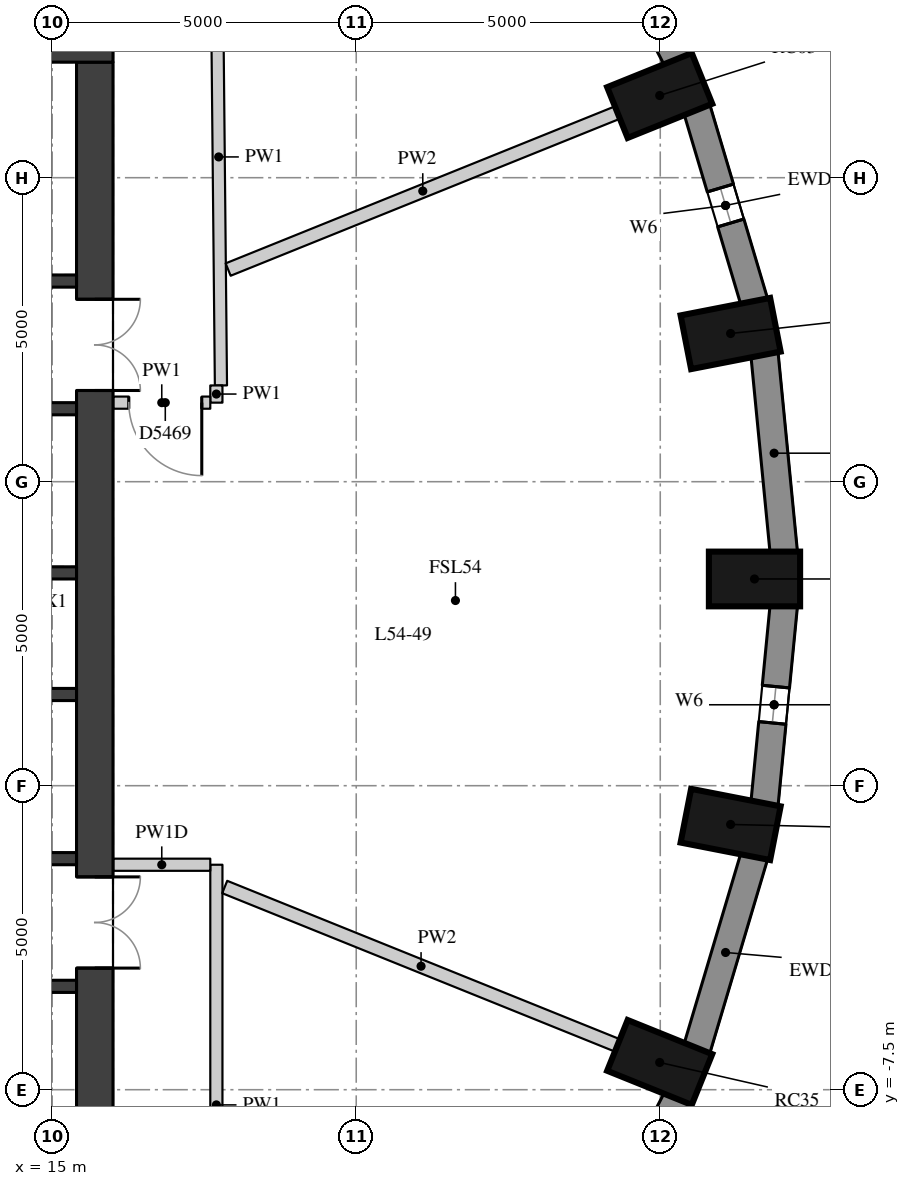
"""IFC4 building model, lengths in metres.
Left out: names, types, materials, properties, quantities, classifications, styles, units other than length and angle.
Written with IfcOpenShell. Run it as: python <this file> out.ifc"""

import sys

from ifc_helpers import new_model, si_unit, direction, frame, frame_2d, origin, origin_2d, place, context, subcontext, project, spatial, rectangle, extrude, element, fill, save


model = new_model("IFC4")
c1 = context("Model", 3, precision=1e-05, world=origin(), true_north=direction((0.0, 1.0)))
c2 = subcontext(c1, "Body", "Model", "MODEL_VIEW")
j1 = project(units=[si_unit("LENGTHUNIT", "METRE"), si_unit("PLANEANGLEUNIT", "RADIAN")], contexts=[c1])
p1 = place(None, origin())
s1 = spatial("IfcSite", under=j1, at=p1, CompositionType="ELEMENT")
p2 = place(p1, origin())
s2 = spatial("IfcBuilding", under=s1, at=p2, CompositionType="ELEMENT")
p3 = place(p2, frame((0.0, 0.0, 192.5)))
s3 = spatial("IfcBuildingStorey", under=s2, at=p3, CompositionType="ELEMENT", Elevation=192.5)
for number, where, z_axis, x_axis in (
    (1, (26.55, 0.9, 0.0), (0.0, 0.0, 1.0), (1.0, 0.0, 0.0)),
    (2, (26.157, 4.937, 0.0), (0.0, 0.0, 1.0), (0.981, 0.192, 0.0)),
    (3, (24.991, 8.852, 0.0), (0.0, 0.0, 1.0), (0.927, 0.374, 0.0)),
    (4, (24.991, -7.052, 0.0), (0.0, 0.0, 1.0), (0.927, -0.374, 0.0)),
    (5, (26.157, -3.137, 0.0), (0.0, 0.0, 1.0), (0.981, -0.192, 0.0)),
):
    element("IfcColumn", number, at=place(p3, frame(where, z_axis=z_axis, x_axis=x_axis)), inside=s3, PredefinedType="COLUMN", context=c2, shape_type="SweptSolid", body=[
        extrude(rectangle(XDim=1.5, YDim=0.9, at=origin_2d()), origin(), (0.0, 0.0, 1.0), 3.3),
    ])
p4 = place(p3, frame((27.032, 1.33, 0.0), z_axis=(0.0, 0.0, 1.0), x_axis=(-0.096824116835, 0.995301507283, 0.0)))
e6 = element("IfcWall", 6, at=p4, inside=s3, PredefinedType="SOLIDWALL", context=c2, shape_type="SweptSolid", body=[
    extrude(rectangle(XDim=3.293, YDim=0.45, at=frame_2d((1.646, 0.0))), origin(), (0.0, 0.0, 1.0), 3.02),
])
p5 = place(p3, frame((26.548, 5.452, 0.0), z_axis=(0.0, 0.0, 1.0), x_axis=(-0.285444972963, 0.958395099847, 0.0)))
e7 = element("IfcWall", 7, at=p5, inside=s3, PredefinedType="SOLIDWALL", context=c2, shape_type="SweptSolid", body=[
    extrude(rectangle(XDim=3.32, YDim=0.45, at=frame_2d((1.66, 0.0))), origin(), (0.0, 0.0, 1.0), 3.02),
])
p6 = place(p5, frame((1.36, 0.0, 0.4)))
e8 = element("IfcOpeningElement", 8, at=p6, cuts=e7, PredefinedType="OPENING", context=c2, shape_type="SweptSolid", body=[
    extrude(rectangle(XDim=0.6, YDim=1.75, at=frame_2d((0.3, 0.875))), frame((0.0, 0.235, 0.0), z_axis=(0.0, -1.0, 0.0), x_axis=(1.0, 0.0, 0.0)), (0.0, 0.0, 1.0), 0.47),
])
p7 = place(p3, frame((25.278, 9.432, 0.0), z_axis=(0.0, 0.0, 1.0), x_axis=(-0.460175500475, 0.887827972505, 0.0)))
e9 = element("IfcWall", 9, at=p7, inside=s3, PredefinedType="SOLIDWALL", context=c2, shape_type="SweptSolid", body=[
    extrude(rectangle(XDim=3.371, YDim=0.45, at=frame_2d((1.685, 0.0))), origin(), (0.0, 0.0, 1.0), 3.02),
])
p8 = place(p3, frame((23.727, -10.624, 0.0), z_axis=(0.0, 0.0, 1.0), x_axis=(0.460175500475, 0.887827972505, 0.0)))
e10 = element("IfcWall", 10, at=p8, inside=s3, PredefinedType="SOLIDWALL", context=c2, shape_type="SweptSolid", body=[
    extrude(rectangle(XDim=3.371, YDim=0.45, at=frame_2d((1.685, 0.0))), origin(), (0.0, 0.0, 1.0), 3.02),
])
p9 = place(p8, frame((1.385, 0.0, 0.4)))
e11 = element("IfcOpeningElement", 11, at=p9, cuts=e10, PredefinedType="OPENING", context=c2, shape_type="SweptSolid", body=[
    extrude(rectangle(XDim=0.6, YDim=1.75, at=frame_2d((0.3, 0.875))), frame((0.0, 0.235, 0.0), z_axis=(0.0, -1.0, 0.0), x_axis=(1.0, 0.0, 0.0)), (0.0, 0.0, 1.0), 0.47),
])
p10 = place(p3, frame((25.6, -6.834, 0.0), z_axis=(0.0, 0.0, 1.0), x_axis=(0.285444972963, 0.958395099847, 0.0)))
e12 = element("IfcWall", 12, at=p10, inside=s3, PredefinedType="SOLIDWALL", context=c2, shape_type="SweptSolid", body=[
    extrude(rectangle(XDim=3.32, YDim=0.45, at=frame_2d((1.66, 0.0))), origin(), (0.0, 0.0, 1.0), 3.02),
])
p11 = place(p3, frame((26.713, -2.808, 0.0), z_axis=(0.0, 0.0, 1.0), x_axis=(0.096816972749, 0.995302202242, 0.0)))
e13 = element("IfcWall", 13, at=p11, inside=s3, PredefinedType="SOLIDWALL", context=c2, shape_type="SweptSolid", body=[
    extrude(rectangle(XDim=3.293, YDim=0.45, at=frame_2d((1.646, 0.0))), origin(), (0.0, 0.0, 1.0), 3.02),
])
p12 = place(p11, frame((1.347, 0.0, 0.4)))
e14 = element("IfcOpeningElement", 14, at=p12, cuts=e13, PredefinedType="OPENING", context=c2, shape_type="SweptSolid", body=[
    extrude(rectangle(XDim=0.6, YDim=1.75, at=frame_2d((0.3, 0.875))), frame((0.0, 0.235, 0.0), z_axis=(0.0, -1.0, 0.0), x_axis=(1.0, 0.0, 0.0)), (0.0, 0.0, 1.0), 0.47),
])
p13 = place(p3, frame((15.7, -9.4, 0.0), z_axis=(0.0, 0.0, 1.0), x_axis=(0.0, 1.0, 0.0)))
e15 = element("IfcWall", 15, at=p13, inside=s3, PredefinedType="SHEAR", context=c2, shape_type="SweptSolid", body=[
    extrude(rectangle(XDim=18.8, YDim=0.6, at=frame_2d((9.4, 0.0))), origin(), (0.0, 0.0, 1.0), 3.02),
])
p14 = place(p13, frame((13.4, 0.0, 0.0)))
e16 = element("IfcOpeningElement", 16, at=p14, cuts=e15, PredefinedType="OPENING", context=c2, shape_type="SweptSolid", body=[
    extrude(rectangle(XDim=1.5, YDim=2.1, at=frame_2d((0.75, 1.05))), frame((0.0, 0.31, 0.0), z_axis=(0.0, -1.0, 0.0), x_axis=(1.0, 0.0, 0.0)), (0.0, 0.0, 1.0), 0.62),
])
p15 = place(p13, frame((3.9, 0.0, 0.0)))
e17 = element("IfcOpeningElement", 17, at=p15, cuts=e15, PredefinedType="OPENING", context=c2, shape_type="SweptSolid", body=[
    extrude(rectangle(XDim=1.5, YDim=2.1, at=frame_2d((0.75, 1.05))), frame((0.0, 0.31, 0.0), z_axis=(0.0, -1.0, 0.0), x_axis=(1.0, 0.0, 0.0)), (0.0, 0.0, 1.0), 0.62),
])
p16 = place(p3, frame((4.0, 9.7, 0.0), z_axis=(0.0, 0.0, 1.0), x_axis=(1.0, 0.0, 0.0)))
e18 = element("IfcWall", 18, at=p16, inside=s3, PredefinedType="SHEAR", context=c2, shape_type="SweptSolid", body=[
    extrude(rectangle(XDim=12.0, YDim=0.6, at=frame_2d((6.0, 0.0))), origin(), (0.0, 0.0, 1.0), 3.02),
])
p17 = place(p3, frame((4.6, 5.8, 0.0), z_axis=(0.0, 0.0, 1.0), x_axis=(1.0, 0.0, 0.0)))
e19 = element("IfcWall", 19, at=p17, inside=s3, PredefinedType="SHEAR", context=c2, shape_type="SweptSolid", body=[
    extrude(rectangle(XDim=10.8, YDim=0.2, at=frame_2d((5.4, 0.0))), origin(), (0.0, 0.0, 1.0), 3.02),
])
p18 = place(p17, frame((7.05, 0.0, 0.0)))
e20 = element("IfcOpeningElement", 20, at=p18, cuts=e19, PredefinedType="OPENING", context=c2, shape_type="SweptSolid", body=[
    extrude(rectangle(XDim=1.1, YDim=2.1, at=frame_2d((0.55, 1.05))), frame((0.0, 0.11, 0.0), z_axis=(0.0, -1.0, 0.0), x_axis=(1.0, 0.0, 0.0)), (0.0, 0.0, 1.0), 0.22),
])
p19 = place(p17, frame((9.05, 0.0, 0.0)))
e21 = element("IfcOpeningElement", 21, at=p19, cuts=e19, PredefinedType="OPENING", context=c2, shape_type="SweptSolid", body=[
    extrude(rectangle(XDim=1.1, YDim=2.1, at=frame_2d((0.55, 1.05))), frame((0.0, 0.11, 0.0), z_axis=(0.0, -1.0, 0.0), x_axis=(1.0, 0.0, 0.0)), (0.0, 0.0, 1.0), 0.22),
])
p20 = place(p3, frame((4.6, 3.7, 0.0), z_axis=(0.0, 0.0, 1.0), x_axis=(1.0, 0.0, 0.0)))
e22 = element("IfcWall", 22, at=p20, inside=s3, PredefinedType="SHEAR", context=c2, shape_type="SweptSolid", body=[
    extrude(rectangle(XDim=10.8, YDim=0.2, at=frame_2d((5.4, 0.0))), origin(), (0.0, 0.0, 1.0), 3.02),
])
p21 = place(p20, frame((6.6, 0.0, 0.0)))
e23 = element("IfcOpeningElement", 23, at=p21, cuts=e22, PredefinedType="OPENING", context=c2, shape_type="SweptSolid", body=[
    extrude(rectangle(XDim=1.1, YDim=2.1, at=frame_2d((0.55, 1.05))), frame((0.0, 0.11, 0.0), z_axis=(0.0, -1.0, 0.0), x_axis=(1.0, 0.0, 0.0)), (0.0, 0.0, 1.0), 0.22),
])
p22 = place(p20, frame((8.9, 0.0, 0.0)))
e24 = element("IfcOpeningElement", 24, at=p22, cuts=e22, PredefinedType="OPENING", context=c2, shape_type="SweptSolid", body=[
    extrude(rectangle(XDim=1.1, YDim=2.1, at=frame_2d((0.55, 1.05))), frame((0.0, 0.11, 0.0), z_axis=(0.0, -1.0, 0.0), x_axis=(1.0, 0.0, 0.0)), (0.0, 0.0, 1.0), 0.22),
])
for number, where, z_axis, x_axis in (
    (25, (4.6, 1.0, 0.0), (0.0, 0.0, 1.0), (1.0, 0.0, 0.0)),
    (26, (4.6, -1.0, 0.0), (0.0, 0.0, 1.0), (1.0, 0.0, 0.0)),
):
    element("IfcWall", number, at=place(p3, frame(where, z_axis=z_axis, x_axis=x_axis)), inside=s3, PredefinedType="SHEAR", context=c2, shape_type="SweptSolid", body=[
        extrude(rectangle(XDim=10.8, YDim=0.2, at=frame_2d((5.4, 0.0))), origin(), (0.0, 0.0, 1.0), 3.02),
    ])
p23 = place(p3, frame((4.6, -3.7, 0.0), z_axis=(0.0, 0.0, 1.0), x_axis=(1.0, 0.0, 0.0)))
e27 = element("IfcWall", 27, at=p23, inside=s3, PredefinedType="SHEAR", context=c2, shape_type="SweptSolid", body=[
    extrude(rectangle(XDim=10.8, YDim=0.2, at=frame_2d((5.4, 0.0))), origin(), (0.0, 0.0, 1.0), 3.02),
])
p24 = place(p23, frame((6.6, 0.0, 0.0)))
e28 = element("IfcOpeningElement", 28, at=p24, cuts=e27, PredefinedType="OPENING", context=c2, shape_type="SweptSolid", body=[
    extrude(rectangle(XDim=1.1, YDim=2.1, at=frame_2d((0.55, 1.05))), frame((0.0, 0.11, 0.0), z_axis=(0.0, -1.0, 0.0), x_axis=(1.0, 0.0, 0.0)), (0.0, 0.0, 1.0), 0.22),
])
p25 = place(p23, frame((8.9, 0.0, 0.0)))
e29 = element("IfcOpeningElement", 29, at=p25, cuts=e27, PredefinedType="OPENING", context=c2, shape_type="SweptSolid", body=[
    extrude(rectangle(XDim=1.1, YDim=2.1, at=frame_2d((0.55, 1.05))), frame((0.0, 0.11, 0.0), z_axis=(0.0, -1.0, 0.0), x_axis=(1.0, 0.0, 0.0)), (0.0, 0.0, 1.0), 0.22),
])
p26 = place(p3, frame((4.6, -5.8, 0.0), z_axis=(0.0, 0.0, 1.0), x_axis=(1.0, 0.0, 0.0)))
e30 = element("IfcWall", 30, at=p26, inside=s3, PredefinedType="SHEAR", context=c2, shape_type="SweptSolid", body=[
    extrude(rectangle(XDim=10.8, YDim=0.2, at=frame_2d((5.4, 0.0))), origin(), (0.0, 0.0, 1.0), 3.02),
])
p27 = place(p3, frame((17.7, -3.8, 0.0), z_axis=(0.0, 0.0, 1.0), x_axis=(0.0, -1.0, 0.0)))
e31 = element("IfcWall", 31, at=p27, inside=s3, PredefinedType="PARTITIONING", context=c2, shape_type="SweptSolid", body=[
    extrude(rectangle(XDim=7.9, YDim=0.2, at=frame_2d((3.95, 0.0))), origin(), (0.0, 0.0, 1.0), 3.02),
])
p28 = place(p3, frame((17.701, 11.6, 0.0), z_axis=(0.0, 0.0, 1.0), x_axis=(0.009840700525, -0.999951579134, 0.0)))
e32 = element("IfcWall", 32, at=p28, inside=s3, PredefinedType="PARTITIONING", context=c2, shape_type="SweptSolid", body=[
    extrude(rectangle(XDim=7.517, YDim=0.2, at=frame_2d((3.759, 0.0))), origin(), (0.0, 0.0, 1.0), 3.02),
])
p29 = place(p3, frame((17.7, 4.083, 0.0), z_axis=(0.0, 0.0, 1.0), x_axis=(0.0, -1.0, 0.0)))
e33 = element("IfcWall", 33, at=p29, inside=s3, PredefinedType="PARTITIONING", context=c2, shape_type="SweptSolid", body=[
    extrude(rectangle(XDim=0.283, YDim=0.2, at=frame_2d((0.142, 0.0))), origin(), (0.0, 0.0, 1.0), 3.02),
])
p30 = place(p3, frame((17.6, 3.8, 0.0), z_axis=(0.0, 0.0, 1.0), x_axis=(-1.0, 0.0, 0.0)))
e34 = element("IfcWall", 34, at=p30, inside=s3, PredefinedType="PARTITIONING", context=c2, shape_type="SweptSolid", body=[
    extrude(rectangle(XDim=1.596, YDim=0.2, at=frame_2d((0.798, 0.0))), origin(), (0.0, 0.0, 1.0), 3.02),
])
p31 = place(p30, frame((0.14, 0.0, 0.0)))
e35 = element("IfcOpeningElement", 35, at=p31, cuts=e34, PredefinedType="OPENING", context=c2, shape_type="SweptSolid", body=[
    extrude(rectangle(XDim=1.2, YDim=2.1, at=frame_2d((0.6, 1.05))), frame((0.0, 0.11, 0.0), z_axis=(0.0, -1.0, 0.0), x_axis=(1.0, 0.0, 0.0)), (0.0, 0.0, 1.0), 0.22),
])
p32 = place(p3, frame((16.004, -3.8, 0.0), z_axis=(0.0, 0.0, 1.0), x_axis=(1.0, 0.0, 0.0)))
e36 = element("IfcWall", 36, at=p32, inside=s3, PredefinedType="PARTITIONING", context=c2, shape_type="SweptSolid", body=[
    extrude(rectangle(XDim=1.596, YDim=0.2, at=frame_2d((0.798, 0.0))), origin(), (0.0, 0.0, 1.0), 2.47),
])
p33 = place(p3, frame((24.295, 8.571, 0.0), z_axis=(0.0, 0.0, 1.0), x_axis=(-0.927397147779, -0.374078240869, 0.0)))
e37 = element("IfcWall", 37, at=p33, inside=s3, PredefinedType="PARTITIONING", context=c2, shape_type="SweptSolid", body=[
    extrude(rectangle(XDim=6.903, YDim=0.22, at=frame_2d((3.452, 0.0))), origin(), (0.0, 0.0, 1.0), 3.02),
])
p34 = place(p3, frame((24.295, -6.771, 0.0), z_axis=(0.0, 0.0, 1.0), x_axis=(-0.927387137769, 0.374103056256, 0.0)))
e38 = element("IfcWall", 38, at=p34, inside=s3, PredefinedType="PARTITIONING", context=c2, shape_type="SweptSolid", body=[
    extrude(rectangle(XDim=6.964, YDim=0.22, at=frame_2d((3.482, 0.0))), origin(), (0.0, 0.0, 1.0), 3.02),
])
p35 = place(p6, origin())
e39 = element("IfcWindow", 39, at=p35, inside=s3, PartitioningType="SINGLE_PANEL", PredefinedType="WINDOW", context=c2, shape_type="SweptSolid", body=[
    extrude(rectangle(XDim=0.6, YDim=1.75, at=frame_2d((0.3, 0.875))), frame((0.0, 0.035, 0.0), z_axis=(0.0, -1.0, 0.0), x_axis=(1.0, 0.0, 0.0)), (0.0, 0.0, 1.0), 0.06),
])
fill(e8, e39)
p36 = place(p12, origin())
e40 = element("IfcWindow", 40, at=p36, inside=s3, PartitioningType="SINGLE_PANEL", PredefinedType="WINDOW", context=c2, shape_type="SweptSolid", body=[
    extrude(rectangle(XDim=0.6, YDim=1.75, at=frame_2d((0.3, 0.875))), frame((0.0, 0.035, 0.0), z_axis=(0.0, -1.0, 0.0), x_axis=(1.0, 0.0, 0.0)), (0.0, 0.0, 1.0), 0.06),
])
fill(e14, e40)
p37 = place(p14, origin())
e41 = element("IfcDoor", 41, at=p37, inside=s3, OperationType="DOUBLE_DOOR_SINGLE_SWING", PredefinedType="DOOR", context=c2, shape_type="SweptSolid", body=[
    extrude(rectangle(XDim=1.5, YDim=2.1, at=frame_2d((0.75, 1.05))), frame((0.0, 0.025, 0.0), z_axis=(0.0, -1.0, 0.0), x_axis=(1.0, 0.0, 0.0)), (0.0, 0.0, 1.0), 0.05),
])
fill(e16, e41)
p38 = place(p15, origin())
e42 = element("IfcDoor", 42, at=p38, inside=s3, OperationType="DOUBLE_DOOR_SINGLE_SWING", PredefinedType="DOOR", context=c2, shape_type="SweptSolid", body=[
    extrude(rectangle(XDim=1.5, YDim=2.1, at=frame_2d((0.75, 1.05))), frame((0.0, 0.025, 0.0), z_axis=(0.0, -1.0, 0.0), x_axis=(1.0, 0.0, 0.0)), (0.0, 0.0, 1.0), 0.05),
])
fill(e17, e42)
p39 = place(p31, origin())
e43 = element("IfcDoor", 43, at=p39, inside=s3, OperationType="SINGLE_SWING_LEFT", PredefinedType="DOOR", context=c2, shape_type="SweptSolid", body=[
    extrude(rectangle(XDim=1.2, YDim=2.1, at=frame_2d((0.6, 1.05))), frame((0.0, 0.025, 0.0), z_axis=(0.0, -1.0, 0.0), x_axis=(1.0, 0.0, 0.0)), (0.0, 0.0, 1.0), 0.05),
])
fill(e35, e43)
save(model, sys.argv[1])
